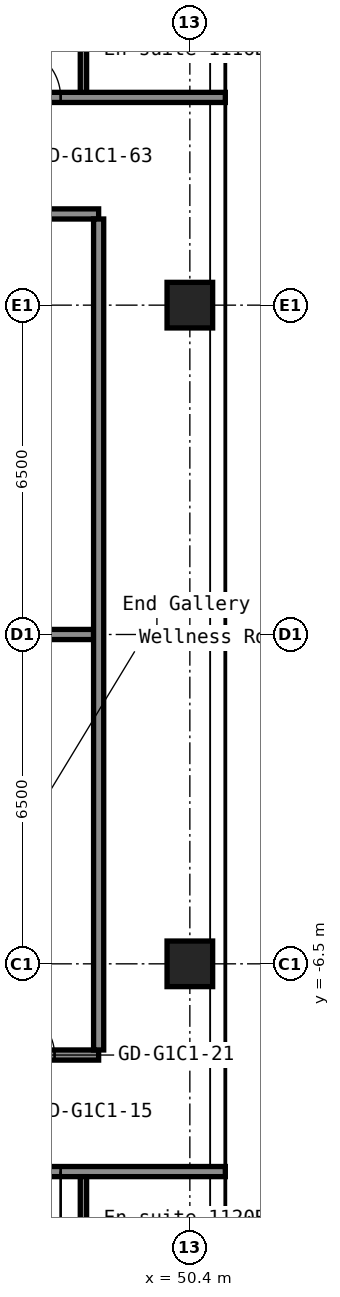
"""IFC4 building model, lengths in metres.
Left out: names, types, materials, properties, quantities, classifications, styles, units other than length and angle.
Written with IfcOpenShell. Run it as: python <this file> out.ifc"""

import sys

from ifc_helpers import new_model, si_unit, direction, frame, frame_2d, origin, origin_2d, place, context, subcontext, project, spatial, rectangle, hollow_rectangle, extrude, element, fill, save


model = new_model("IFC4")
c1 = context("Model", 3, precision=1e-05, world=origin(), true_north=direction((0.0, 1.0)))
c2 = subcontext(c1, "Body", "Model", "MODEL_VIEW")
j1 = project(units=[si_unit("LENGTHUNIT", "METRE"), si_unit("PLANEANGLEUNIT", "RADIAN")], contexts=[c1])
p1 = place(None, origin())
s1 = spatial("IfcSite", under=j1, at=p1, CompositionType="ELEMENT")
p2 = place(p1, origin())
s2 = spatial("IfcBuilding", under=s1, at=p2, CompositionType="ELEMENT")
p3 = place(p2, frame((0.0, 0.0, 42.2)))
s3 = spatial("IfcBuildingStorey", under=s2, at=p3, CompositionType="ELEMENT", Elevation=42.2)
for number, where, z_axis, x_axis in (
    (1, (50.4, -6.5, 0.0), (0.0, 0.0, 1.0), (1.0, 0.0, 0.0)),
    (2, (50.4, 6.5, 0.0), (0.0, 0.0, 1.0), (1.0, 0.0, 0.0)),
):
    element("IfcColumn", number, at=place(p3, frame(where, z_axis=z_axis, x_axis=x_axis)), inside=s3, PredefinedType="COLUMN", context=c2, shape_type="SweptSolid", body=[
        extrude(hollow_rectangle(XDim=0.9, YDim=0.9, WallThickness=0.036, at=origin_2d()), origin(), (0.0, 0.0, 1.0), 2.8),
    ])
p4 = place(p3, frame((16.8, -10.6, 0.0), z_axis=(0.0, 0.0, 1.0), x_axis=(1.0, 0.0, 0.0)))
e3 = element("IfcWall", 3, at=p4, inside=s3, PredefinedType="PARTITIONING", context=c2, shape_type="SweptSolid", body=[
    extrude(rectangle(XDim=34.3, YDim=0.2, at=frame_2d((17.15, 0.0))), origin(), (0.0, 0.0, 1.0), 2.8),
])
p5 = place(p4, frame((2.0, 0.0, 0.0)))
e4 = element("IfcOpeningElement", 4, at=p5, cuts=e3, PredefinedType="OPENING", context=c2, shape_type="SweptSolid", body=[
    extrude(rectangle(XDim=1.0, YDim=2.1, at=frame_2d((0.5, 1.05))), frame((0.0, 0.11, 0.0), z_axis=(0.0, -1.0, 0.0), x_axis=(1.0, 0.0, 0.0)), (0.0, 0.0, 1.0), 0.22),
])
p6 = place(p4, frame((11.25, 0.0, 0.0)))
e5 = element("IfcOpeningElement", 5, at=p6, cuts=e3, PredefinedType="OPENING", context=c2, shape_type="SweptSolid", body=[
    extrude(rectangle(XDim=1.0, YDim=2.1, at=frame_2d((0.5, 1.05))), frame((0.0, 0.11, 0.0), z_axis=(0.0, -1.0, 0.0), x_axis=(1.0, 0.0, 0.0)), (0.0, 0.0, 1.0), 0.22),
])
p7 = place(p4, frame((12.95, 0.0, 0.0)))
e6 = element("IfcOpeningElement", 6, at=p7, cuts=e3, PredefinedType="OPENING", context=c2, shape_type="SweptSolid", body=[
    extrude(rectangle(XDim=1.0, YDim=2.1, at=frame_2d((0.5, 1.05))), frame((0.0, 0.11, 0.0), z_axis=(0.0, -1.0, 0.0), x_axis=(1.0, 0.0, 0.0)), (0.0, 0.0, 1.0), 0.22),
])
p8 = place(p4, frame((18.8, 0.0, 0.0)))
e7 = element("IfcOpeningElement", 7, at=p8, cuts=e3, PredefinedType="OPENING", context=c2, shape_type="SweptSolid", body=[
    extrude(rectangle(XDim=1.0, YDim=2.1, at=frame_2d((0.5, 1.05))), frame((0.0, 0.11, 0.0), z_axis=(0.0, -1.0, 0.0), x_axis=(1.0, 0.0, 0.0)), (0.0, 0.0, 1.0), 0.22),
])
p9 = place(p4, frame((28.15, 0.0, 0.0)))
e8 = element("IfcOpeningElement", 8, at=p9, cuts=e3, PredefinedType="OPENING", context=c2, shape_type="SweptSolid", body=[
    extrude(rectangle(XDim=1.0, YDim=2.1, at=frame_2d((0.5, 1.05))), frame((0.0, 0.11, 0.0), z_axis=(0.0, -1.0, 0.0), x_axis=(1.0, 0.0, 0.0)), (0.0, 0.0, 1.0), 0.22),
])
p10 = place(p4, frame((30.05, 0.0, 0.0)))
e9 = element("IfcOpeningElement", 9, at=p10, cuts=e3, PredefinedType="OPENING", context=c2, shape_type="SweptSolid", body=[
    extrude(rectangle(XDim=1.0, YDim=2.1, at=frame_2d((0.5, 1.05))), frame((0.0, 0.11, 0.0), z_axis=(0.0, -1.0, 0.0), x_axis=(1.0, 0.0, 0.0)), (0.0, 0.0, 1.0), 0.22),
])
p11 = place(p3, frame((33.6, -8.3, 0.0), z_axis=(0.0, 0.0, 1.0), x_axis=(1.0, 0.0, 0.0)))
e10 = element("IfcWall", 10, at=p11, inside=s3, PredefinedType="PARTITIONING", context=c2, shape_type="SweptSolid", body=[
    extrude(rectangle(XDim=15.0, YDim=0.2, at=frame_2d((7.5, 0.0))), origin(), (0.0, 0.0, 1.0), 2.8),
])
p12 = place(p11, frame((4.2, 0.0, 0.0)))
e11 = element("IfcOpeningElement", 11, at=p12, cuts=e10, PredefinedType="OPENING", context=c2, shape_type="SweptSolid", body=[
    extrude(rectangle(XDim=1.6, YDim=2.1, at=frame_2d((0.8, 1.05))), frame((0.0, 0.11, 0.0), z_axis=(0.0, -1.0, 0.0), x_axis=(1.0, 0.0, 0.0)), (0.0, 0.0, 1.0), 0.22),
])
p13 = place(p11, frame((9.93, 0.0, 0.0)))
e12 = element("IfcOpeningElement", 12, at=p13, cuts=e10, PredefinedType="OPENING", context=c2, shape_type="SweptSolid", body=[
    extrude(rectangle(XDim=0.9, YDim=2.1, at=frame_2d((0.45, 1.05))), frame((0.0, 0.11, 0.0), z_axis=(0.0, -1.0, 0.0), x_axis=(1.0, 0.0, 0.0)), (0.0, 0.0, 1.0), 0.22),
])
p14 = place(p11, frame((13.23, 0.0, 0.0)))
e13 = element("IfcOpeningElement", 13, at=p14, cuts=e10, PredefinedType="OPENING", context=c2, shape_type="SweptSolid", body=[
    extrude(rectangle(XDim=0.9, YDim=2.1, at=frame_2d((0.45, 1.05))), frame((0.0, 0.11, 0.0), z_axis=(0.0, -1.0, 0.0), x_axis=(1.0, 0.0, 0.0)), (0.0, 0.0, 1.0), 0.22),
])
p15 = place(p3, frame((33.6, 0.0, 0.0), z_axis=(0.0, 0.0, 1.0), x_axis=(1.0, 0.0, 0.0)))
e14 = element("IfcWall", 14, at=p15, inside=s3, PredefinedType="PARTITIONING", context=c2, shape_type="SweptSolid", body=[
    extrude(rectangle(XDim=14.9, YDim=0.2, at=frame_2d((7.45, 0.0))), origin(), (0.0, 0.0, 1.0), 2.8),
])
p16 = place(p3, frame((33.6, 8.3, 0.0), z_axis=(0.0, 0.0, 1.0), x_axis=(1.0, 0.0, 0.0)))
e15 = element("IfcWall", 15, at=p16, inside=s3, PredefinedType="PARTITIONING", context=c2, shape_type="SweptSolid", body=[
    extrude(rectangle(XDim=15.0, YDim=0.2, at=frame_2d((7.5, 0.0))), origin(), (0.0, 0.0, 1.0), 2.8),
])
p17 = place(p16, frame((4.2, 0.0, 0.0)))
e16 = element("IfcOpeningElement", 16, at=p17, cuts=e15, PredefinedType="OPENING", context=c2, shape_type="SweptSolid", body=[
    extrude(rectangle(XDim=1.6, YDim=2.1, at=frame_2d((0.8, 1.05))), frame((0.0, 0.11, 0.0), z_axis=(0.0, -1.0, 0.0), x_axis=(1.0, 0.0, 0.0)), (0.0, 0.0, 1.0), 0.22),
])
p18 = place(p3, frame((16.8, 10.6, 0.0), z_axis=(0.0, 0.0, 1.0), x_axis=(1.0, 0.0, 0.0)))
e17 = element("IfcWall", 17, at=p18, inside=s3, PredefinedType="PARTITIONING", context=c2, shape_type="SweptSolid", body=[
    extrude(rectangle(XDim=34.3, YDim=0.2, at=frame_2d((17.15, 0.0))), origin(), (0.0, 0.0, 1.0), 2.8),
])
p19 = place(p18, frame((2.0, 0.0, 0.0)))
e18 = element("IfcOpeningElement", 18, at=p19, cuts=e17, PredefinedType="OPENING", context=c2, shape_type="SweptSolid", body=[
    extrude(rectangle(XDim=1.0, YDim=2.1, at=frame_2d((0.5, 1.05))), frame((0.0, 0.11, 0.0), z_axis=(0.0, -1.0, 0.0), x_axis=(1.0, 0.0, 0.0)), (0.0, 0.0, 1.0), 0.22),
])
p20 = place(p18, frame((11.25, 0.0, 0.0)))
e19 = element("IfcOpeningElement", 19, at=p20, cuts=e17, PredefinedType="OPENING", context=c2, shape_type="SweptSolid", body=[
    extrude(rectangle(XDim=1.0, YDim=2.1, at=frame_2d((0.5, 1.05))), frame((0.0, 0.11, 0.0), z_axis=(0.0, -1.0, 0.0), x_axis=(1.0, 0.0, 0.0)), (0.0, 0.0, 1.0), 0.22),
])
p21 = place(p18, frame((12.95, 0.0, 0.0)))
e20 = element("IfcOpeningElement", 20, at=p21, cuts=e17, PredefinedType="OPENING", context=c2, shape_type="SweptSolid", body=[
    extrude(rectangle(XDim=1.0, YDim=2.1, at=frame_2d((0.5, 1.05))), frame((0.0, 0.11, 0.0), z_axis=(0.0, -1.0, 0.0), x_axis=(1.0, 0.0, 0.0)), (0.0, 0.0, 1.0), 0.22),
])
p22 = place(p18, frame((18.8, 0.0, 0.0)))
e21 = element("IfcOpeningElement", 21, at=p22, cuts=e17, PredefinedType="OPENING", context=c2, shape_type="SweptSolid", body=[
    extrude(rectangle(XDim=1.0, YDim=2.1, at=frame_2d((0.5, 1.05))), frame((0.0, 0.11, 0.0), z_axis=(0.0, -1.0, 0.0), x_axis=(1.0, 0.0, 0.0)), (0.0, 0.0, 1.0), 0.22),
])
p23 = place(p18, frame((28.15, 0.0, 0.0)))
e22 = element("IfcOpeningElement", 22, at=p23, cuts=e17, PredefinedType="OPENING", context=c2, shape_type="SweptSolid", body=[
    extrude(rectangle(XDim=1.0, YDim=2.1, at=frame_2d((0.5, 1.05))), frame((0.0, 0.11, 0.0), z_axis=(0.0, -1.0, 0.0), x_axis=(1.0, 0.0, 0.0)), (0.0, 0.0, 1.0), 0.22),
])
p24 = place(p18, frame((30.05, 0.0, 0.0)))
e23 = element("IfcOpeningElement", 23, at=p24, cuts=e17, PredefinedType="OPENING", context=c2, shape_type="SweptSolid", body=[
    extrude(rectangle(XDim=1.0, YDim=2.1, at=frame_2d((0.5, 1.05))), frame((0.0, 0.11, 0.0), z_axis=(0.0, -1.0, 0.0), x_axis=(1.0, 0.0, 0.0)), (0.0, 0.0, 1.0), 0.22),
])
p25 = place(p3, frame((48.3, -13.6, 0.0), z_axis=(0.0, 0.0, 1.0), x_axis=(0.0, 1.0, 0.0)))
e24 = element("IfcWall", 24, at=p25, inside=s3, PredefinedType="PARTITIONING", context=c2, shape_type="SweptSolid", body=[
    extrude(rectangle(XDim=2.9, YDim=0.125, at=frame_2d((1.45, 0.0))), origin(), (0.0, 0.0, 1.0), 2.8),
])
p26 = place(p25, frame((0.6, 0.0, 0.0)))
e25 = element("IfcOpeningElement", 25, at=p26, cuts=e24, PredefinedType="OPENING", context=c2, shape_type="SweptSolid", body=[
    extrude(rectangle(XDim=0.8, YDim=2.1, at=frame_2d((0.4, 1.05))), frame((0.0, 0.073, 0.0), z_axis=(0.0, -1.0, 0.0), x_axis=(1.0, 0.0, 0.0)), (0.0, 0.0, 1.0), 0.145),
])
p27 = place(p3, frame((48.3, 10.7, 0.0), z_axis=(0.0, 0.0, 1.0), x_axis=(0.0, 1.0, 0.0)))
e26 = element("IfcWall", 26, at=p27, inside=s3, PredefinedType="PARTITIONING", context=c2, shape_type="SweptSolid", body=[
    extrude(rectangle(XDim=2.9, YDim=0.125, at=frame_2d((1.45, 0.0))), origin(), (0.0, 0.0, 1.0), 2.8),
])
p28 = place(p27, frame((1.5, 0.0, 0.0)))
e27 = element("IfcOpeningElement", 27, at=p28, cuts=e26, PredefinedType="OPENING", context=c2, shape_type="SweptSolid", body=[
    extrude(rectangle(XDim=0.8, YDim=2.1, at=frame_2d((0.4, 1.05))), frame((0.0, 0.073, 0.0), z_axis=(0.0, -1.0, 0.0), x_axis=(1.0, 0.0, 0.0)), (0.0, 0.0, 1.0), 0.145),
])
p29 = place(p3, frame((48.6, -8.2, 0.0), z_axis=(0.0, 0.0, 1.0), x_axis=(0.0, 1.0, 0.0)))
e28 = element("IfcWall", 28, at=p29, inside=s3, PredefinedType="PARTITIONING", context=c2, shape_type="SweptSolid", body=[
    extrude(rectangle(XDim=16.4, YDim=0.2, at=frame_2d((8.2, 0.0))), origin(), (0.0, 0.0, 1.0), 2.8),
])
p30 = place(p10, origin())
e29 = element("IfcDoor", 29, at=p30, inside=s3, OperationType="SINGLE_SWING_RIGHT", PredefinedType="DOOR", context=c2, shape_type="SweptSolid", body=[
    extrude(rectangle(XDim=1.0, YDim=2.1, at=frame_2d((0.5, 1.05))), frame((0.0, 0.025, 0.0), z_axis=(0.0, -1.0, 0.0), x_axis=(1.0, 0.0, 0.0)), (0.0, 0.0, 1.0), 0.05),
])
fill(e9, e29)
p31 = place(p14, origin())
e30 = element("IfcDoor", 30, at=p31, inside=s3, OperationType="SINGLE_SWING_RIGHT", PredefinedType="DOOR", context=c2, shape_type="SweptSolid", body=[
    extrude(rectangle(XDim=0.9, YDim=2.1, at=frame_2d((0.45, 1.05))), frame((0.0, 0.025, 0.0), z_axis=(0.0, -1.0, 0.0), x_axis=(1.0, 0.0, 0.0)), (0.0, 0.0, 1.0), 0.05),
])
fill(e13, e30)
p32 = place(p24, origin())
e31 = element("IfcDoor", 31, at=p32, inside=s3, OperationType="SINGLE_SWING_RIGHT", PredefinedType="DOOR", context=c2, shape_type="SweptSolid", body=[
    extrude(rectangle(XDim=1.0, YDim=2.1, at=frame_2d((0.5, 1.05))), frame((0.0, 0.025, 0.0), z_axis=(0.0, -1.0, 0.0), x_axis=(1.0, 0.0, 0.0)), (0.0, 0.0, 1.0), 0.05),
])
fill(e23, e31)
save(model, sys.argv[1])
